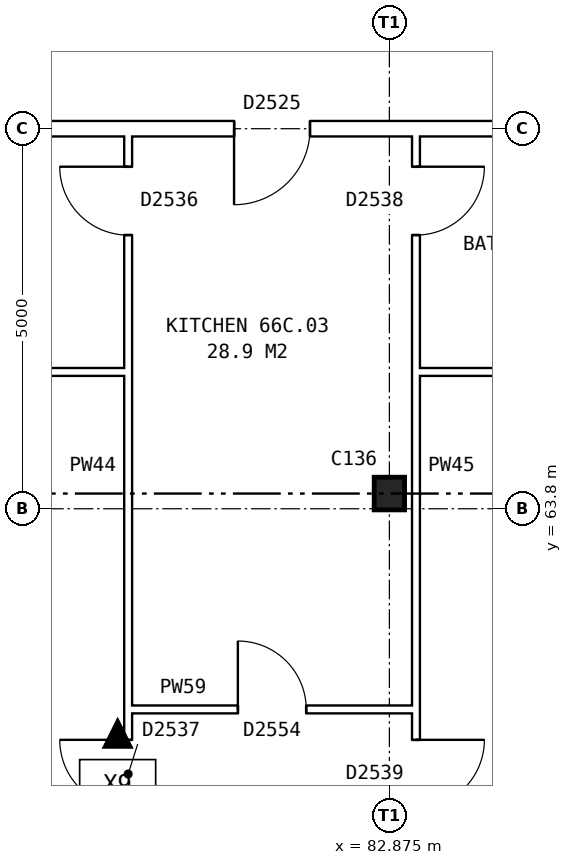
"""IFC4 building model, lengths in metres.
Left out: names, types, materials, properties, quantities, classifications, styles, units other than length and angle.
Written with IfcOpenShell. Run it as: python <this file> out.ifc"""

import sys

from ifc_helpers import new_model, si_unit, direction, frame, frame_2d, origin, origin_2d, place, context, subcontext, project, spatial, rectangle, i_section, extrude, element, fill, save


model = new_model("IFC4")
c1 = context("Model", 3, precision=1e-05, world=origin(), true_north=direction((0.0, 1.0)))
c2 = subcontext(c1, "Body", "Model", "MODEL_VIEW")
j1 = project(units=[si_unit("LENGTHUNIT", "METRE"), si_unit("PLANEANGLEUNIT", "RADIAN")], contexts=[c1])
p1 = place(None, origin())
s1 = spatial("IfcSite", under=j1, at=p1, CompositionType="ELEMENT")
p2 = place(p1, origin())
s2 = spatial("IfcBuilding", under=s1, at=p2, CompositionType="ELEMENT")
p3 = place(p2, frame((0.0, 0.0, 233.8)))
s3 = spatial("IfcBuildingStorey", under=s2, at=p3, CompositionType="ELEMENT", Elevation=233.8)
p4 = place(p3, frame((82.875, 64.0, 0.0), z_axis=(0.0, 0.0, 1.0), x_axis=(1.0, 0.0, 0.0)))
e1 = element("IfcColumn", 1, at=p4, inside=s3, PredefinedType="COLUMN", context=c2, shape_type="SweptSolid", body=[
    extrude(i_section(OverallWidth=0.4, OverallDepth=0.43, WebThickness=0.028, FlangeThickness=0.04, at=origin_2d()), origin(), (0.0, 0.0, 1.0), 2.85),
])
p5 = place(p3, frame((79.438, 61.16, 0.0), z_axis=(0.0, 0.0, 1.0), x_axis=(1.0, 0.0, 0.0)))
e2 = element("IfcWall", 2, at=p5, inside=s3, PredefinedType="PARTITIONING", context=c2, shape_type="SweptSolid", body=[
    extrude(rectangle(XDim=3.787, YDim=0.1, at=frame_2d((1.894, 0.0))), origin(), (0.0, 0.0, 1.0), 2.85),
])
p6 = place(p5, frame((1.444, 0.0, 0.0)))
e3 = element("IfcOpeningElement", 3, at=p6, cuts=e2, PredefinedType="OPENING", context=c2, shape_type="SweptSolid", body=[
    extrude(rectangle(XDim=0.9, YDim=2.1, at=frame_2d((0.45, 1.05))), frame((0.0, 0.06, 0.0), z_axis=(0.0, -1.0, 0.0), x_axis=(1.0, 0.0, 0.0)), (0.0, 0.0, 1.0), 0.12),
])
p7 = place(p3, frame((75.64, 65.6, 0.0), z_axis=(0.0, 0.0, 1.0), x_axis=(1.0, 0.0, 0.0)))
e4 = element("IfcWall", 4, at=p7, inside=s3, PredefinedType="PARTITIONING", context=c2, shape_type="SweptSolid", body=[
    extrude(rectangle(XDim=3.798, YDim=0.1, at=frame_2d((1.899, 0.0))), origin(), (0.0, 0.0, 1.0), 2.85),
])
p8 = place(p3, frame((83.225, 65.6, 0.0), z_axis=(0.0, 0.0, 1.0), x_axis=(1.0, 0.0, 0.0)))
e5 = element("IfcWall", 5, at=p8, inside=s3, PredefinedType="PARTITIONING", context=c2, shape_type="SweptSolid", body=[
    extrude(rectangle(XDim=3.337, YDim=0.1, at=frame_2d((1.668, 0.0))), origin(), (0.0, 0.0, 1.0), 2.85),
])
p9 = place(p3, frame((75.64, 68.8, 0.0), z_axis=(0.0, 0.0, 1.0), x_axis=(1.0, 0.0, 0.0)))
e6 = element("IfcWall", 6, at=p9, inside=s3, PredefinedType="PARTITIONING", context=c2, shape_type="SweptSolid", body=[
    extrude(rectangle(XDim=55.72, YDim=0.2, at=frame_2d((27.86, 0.0))), origin(), (0.0, 0.0, 1.0), 2.85),
])
p10 = place(p9, frame((5.191, 0.0, 0.0)))
e7 = element("IfcOpeningElement", 7, at=p10, cuts=e6, PredefinedType="OPENING", context=c2, shape_type="SweptSolid", body=[
    extrude(rectangle(XDim=1.0, YDim=2.1, at=frame_2d((0.5, 1.05))), frame((0.0, 0.11, 0.0), z_axis=(0.0, -1.0, 0.0), x_axis=(1.0, 0.0, 0.0)), (0.0, 0.0, 1.0), 0.22),
])
p11 = place(p9, frame((12.241, 0.0, 0.0)))
e8 = element("IfcOpeningElement", 8, at=p11, cuts=e6, PredefinedType="OPENING", context=c2, shape_type="SweptSolid", body=[
    extrude(rectangle(XDim=1.0, YDim=2.1, at=frame_2d((0.5, 1.05))), frame((0.0, 0.11, 0.0), z_axis=(0.0, -1.0, 0.0), x_axis=(1.0, 0.0, 0.0)), (0.0, 0.0, 1.0), 0.22),
])
p12 = place(p9, frame((22.553, 0.0, 0.0)))
e9 = element("IfcOpeningElement", 9, at=p12, cuts=e6, PredefinedType="OPENING", context=c2, shape_type="SweptSolid", body=[
    extrude(rectangle(XDim=1.0, YDim=2.1, at=frame_2d((0.5, 1.05))), frame((0.0, 0.11, 0.0), z_axis=(0.0, -1.0, 0.0), x_axis=(1.0, 0.0, 0.0)), (0.0, 0.0, 1.0), 0.22),
])
p13 = place(p9, frame((32.866, 0.0, 0.0)))
e10 = element("IfcOpeningElement", 10, at=p13, cuts=e6, PredefinedType="OPENING", context=c2, shape_type="SweptSolid", body=[
    extrude(rectangle(XDim=1.0, YDim=2.1, at=frame_2d((0.5, 1.05))), frame((0.0, 0.11, 0.0), z_axis=(0.0, -1.0, 0.0), x_axis=(1.0, 0.0, 0.0)), (0.0, 0.0, 1.0), 0.22),
])
p14 = place(p9, frame((36.303, 0.0, 0.0)))
e11 = element("IfcOpeningElement", 11, at=p14, cuts=e6, PredefinedType="OPENING", context=c2, shape_type="SweptSolid", body=[
    extrude(rectangle(XDim=1.0, YDim=2.1, at=frame_2d((0.5, 1.05))), frame((0.0, 0.11, 0.0), z_axis=(0.0, -1.0, 0.0), x_axis=(1.0, 0.0, 0.0)), (0.0, 0.0, 1.0), 0.22),
])
p15 = place(p9, frame((46.616, 0.0, 0.0)))
e12 = element("IfcOpeningElement", 12, at=p15, cuts=e6, PredefinedType="OPENING", context=c2, shape_type="SweptSolid", body=[
    extrude(rectangle(XDim=1.0, YDim=2.1, at=frame_2d((0.5, 1.05))), frame((0.0, 0.11, 0.0), z_axis=(0.0, -1.0, 0.0), x_axis=(1.0, 0.0, 0.0)), (0.0, 0.0, 1.0), 0.22),
])
p16 = place(p9, frame((53.496, 0.0, 0.0)))
e13 = element("IfcOpeningElement", 13, at=p16, cuts=e6, PredefinedType="OPENING", context=c2, shape_type="SweptSolid", body=[
    extrude(rectangle(XDim=1.0, YDim=2.1, at=frame_2d((0.5, 1.05))), frame((0.0, 0.11, 0.0), z_axis=(0.0, -1.0, 0.0), x_axis=(1.0, 0.0, 0.0)), (0.0, 0.0, 1.0), 0.22),
])
p17 = place(p3, frame((79.438, 54.36, 0.0), z_axis=(0.0, 0.0, 1.0), x_axis=(0.0, 1.0, 0.0)))
e14 = element("IfcWall", 14, at=p17, inside=s3, PredefinedType="PARTITIONING", context=c2, shape_type="SweptSolid", body=[
    extrude(rectangle(XDim=14.34, YDim=0.1, at=frame_2d((7.17, 0.0))), origin(), (0.0, 0.0, 1.0), 2.85),
])
p18 = place(p17, frame((5.5, 0.0, 0.0)))
e15 = element("IfcOpeningElement", 15, at=p18, cuts=e14, PredefinedType="OPENING", context=c2, shape_type="SweptSolid", body=[
    extrude(rectangle(XDim=0.9, YDim=2.1, at=frame_2d((0.45, 1.05))), frame((0.0, 0.06, 0.0), z_axis=(0.0, -1.0, 0.0), x_axis=(1.0, 0.0, 0.0)), (0.0, 0.0, 1.0), 0.12),
])
p19 = place(p17, frame((13.04, 0.0, 0.0)))
e16 = element("IfcOpeningElement", 16, at=p19, cuts=e14, PredefinedType="OPENING", context=c2, shape_type="SweptSolid", body=[
    extrude(rectangle(XDim=0.9, YDim=2.1, at=frame_2d((0.45, 1.05))), frame((0.0, 0.06, 0.0), z_axis=(0.0, -1.0, 0.0), x_axis=(1.0, 0.0, 0.0)), (0.0, 0.0, 1.0), 0.12),
])
p20 = place(p3, frame((83.225, 54.36, 0.0), z_axis=(0.0, 0.0, 1.0), x_axis=(0.0, 1.0, 0.0)))
e17 = element("IfcWall", 17, at=p20, inside=s3, PredefinedType="PARTITIONING", context=c2, shape_type="SweptSolid", body=[
    extrude(rectangle(XDim=14.34, YDim=0.1, at=frame_2d((7.17, 0.0))), origin(), (0.0, 0.0, 1.0), 2.85),
])
p21 = place(p20, frame((5.5, 0.0, 0.0)))
e18 = element("IfcOpeningElement", 18, at=p21, cuts=e17, PredefinedType="OPENING", context=c2, shape_type="SweptSolid", body=[
    extrude(rectangle(XDim=0.9, YDim=2.1, at=frame_2d((0.45, 1.05))), frame((0.0, 0.06, 0.0), z_axis=(0.0, -1.0, 0.0), x_axis=(1.0, 0.0, 0.0)), (0.0, 0.0, 1.0), 0.12),
])
p22 = place(p20, frame((13.04, 0.0, 0.0)))
e19 = element("IfcOpeningElement", 19, at=p22, cuts=e17, PredefinedType="OPENING", context=c2, shape_type="SweptSolid", body=[
    extrude(rectangle(XDim=0.9, YDim=2.1, at=frame_2d((0.45, 1.05))), frame((0.0, 0.06, 0.0), z_axis=(0.0, -1.0, 0.0), x_axis=(1.0, 0.0, 0.0)), (0.0, 0.0, 1.0), 0.12),
])
p23 = place(p18, origin())
e20 = element("IfcDoor", 20, at=p23, inside=s3, OperationType="SINGLE_SWING_RIGHT", PredefinedType="DOOR", context=c2, shape_type="SweptSolid", body=[
    extrude(rectangle(XDim=0.9, YDim=2.1, at=frame_2d((0.45, 1.05))), frame((0.0, 0.025, 0.0), z_axis=(0.0, -1.0, 0.0), x_axis=(1.0, 0.0, 0.0)), (0.0, 0.0, 1.0), 0.05),
])
fill(e15, e20)
p24 = place(p21, frame((0.9, 0.0, 0.0), z_axis=(0.0, 0.0, 1.0), x_axis=(-1.0, 0.0, 0.0)))
e21 = element("IfcDoor", 21, at=p24, inside=s3, OperationType="SINGLE_SWING_LEFT", PredefinedType="DOOR", context=c2, shape_type="SweptSolid", body=[
    extrude(rectangle(XDim=0.9, YDim=2.1, at=frame_2d((0.45, 1.05))), frame((0.0, 0.025, 0.0), z_axis=(0.0, -1.0, 0.0), x_axis=(1.0, 0.0, 0.0)), (0.0, 0.0, 1.0), 0.05),
])
fill(e18, e21)
p25 = place(p10, frame((1.0, 0.0, 0.0), z_axis=(0.0, 0.0, 1.0), x_axis=(-1.0, 0.0, 0.0)))
e22 = element("IfcDoor", 22, at=p25, inside=s3, OperationType="SINGLE_SWING_RIGHT", PredefinedType="DOOR", context=c2, shape_type="SweptSolid", body=[
    extrude(rectangle(XDim=1.0, YDim=2.1, at=frame_2d((0.5, 1.05))), frame((0.0, 0.025, 0.0), z_axis=(0.0, -1.0, 0.0), x_axis=(1.0, 0.0, 0.0)), (0.0, 0.0, 1.0), 0.05),
])
fill(e7, e22)
p26 = place(p6, origin())
e23 = element("IfcDoor", 23, at=p26, inside=s3, OperationType="SINGLE_SWING_LEFT", PredefinedType="DOOR", context=c2, shape_type="SweptSolid", body=[
    extrude(rectangle(XDim=0.9, YDim=2.1, at=frame_2d((0.45, 1.05))), frame((0.0, 0.025, 0.0), z_axis=(0.0, -1.0, 0.0), x_axis=(1.0, 0.0, 0.0)), (0.0, 0.0, 1.0), 0.05),
])
fill(e3, e23)
p27 = place(p19, origin())
e24 = element("IfcDoor", 24, at=p27, inside=s3, OperationType="SINGLE_SWING_RIGHT", PredefinedType="DOOR", context=c2, shape_type="SweptSolid", body=[
    extrude(rectangle(XDim=0.9, YDim=2.1, at=frame_2d((0.45, 1.05))), frame((0.0, 0.025, 0.0), z_axis=(0.0, -1.0, 0.0), x_axis=(1.0, 0.0, 0.0)), (0.0, 0.0, 1.0), 0.05),
])
fill(e16, e24)
p28 = place(p22, frame((0.9, 0.0, 0.0), z_axis=(0.0, 0.0, 1.0), x_axis=(-1.0, 0.0, 0.0)))
e25 = element("IfcDoor", 25, at=p28, inside=s3, OperationType="SINGLE_SWING_LEFT", PredefinedType="DOOR", context=c2, shape_type="SweptSolid", body=[
    extrude(rectangle(XDim=0.9, YDim=2.1, at=frame_2d((0.45, 1.05))), frame((0.0, 0.025, 0.0), z_axis=(0.0, -1.0, 0.0), x_axis=(1.0, 0.0, 0.0)), (0.0, 0.0, 1.0), 0.05),
])
fill(e19, e25)
save(model, sys.argv[1])
